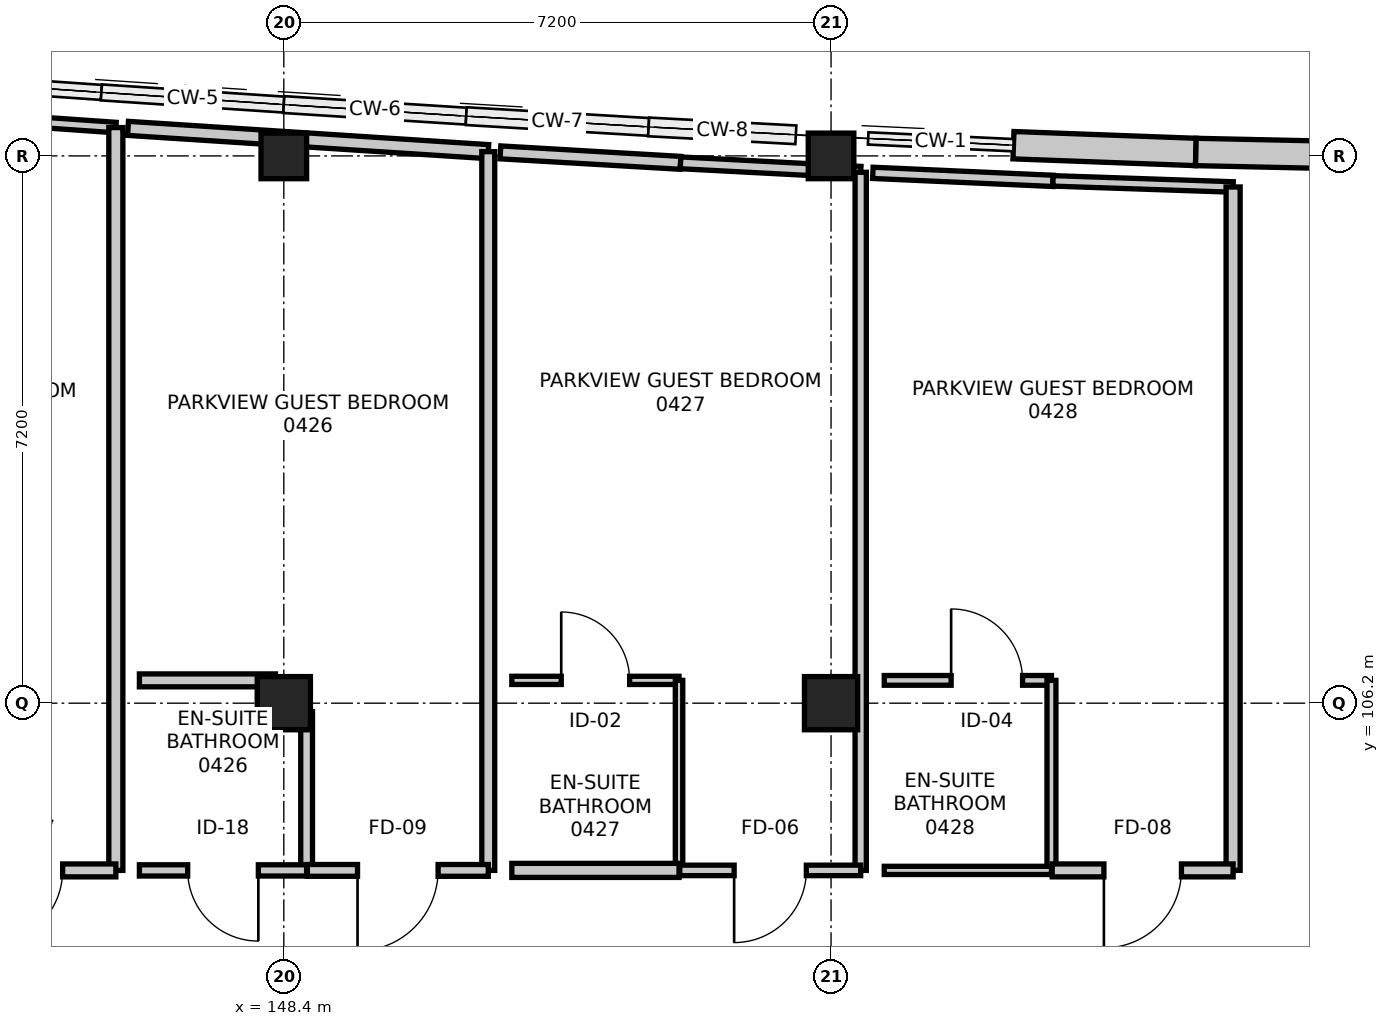
"""IFC4 building model, lengths in metres.
Left out: names, types, materials, properties, quantities, classifications, styles, units other than length and angle.
Written with IfcOpenShell. Run it as: python <this file> out.ifc"""

import sys

from ifc_helpers import new_model, si_unit, direction, frame, frame_2d, origin, origin_2d, place, context, subcontext, project, spatial, rectangle, extrude, element, fill, save


model = new_model("IFC4")
c1 = context("Model", 3, precision=1e-05, world=origin(), true_north=direction((0.0, 1.0)))
c2 = subcontext(c1, "Body", "Model", "MODEL_VIEW")
j1 = project(units=[si_unit("LENGTHUNIT", "METRE"), si_unit("PLANEANGLEUNIT", "RADIAN")], contexts=[c1])
p1 = place(None, origin())
s1 = spatial("IfcSite", under=j1, at=p1, CompositionType="ELEMENT")
p2 = place(p1, origin())
s2 = spatial("IfcBuilding", under=s1, at=p2, CompositionType="ELEMENT")
p3 = place(p2, frame((0.0, 0.0, 19.2)))
s3 = spatial("IfcBuildingStorey", under=s2, at=p3, CompositionType="ELEMENT", Elevation=19.2)
p4 = place(p3, frame((148.4, 106.2, 0.0), z_axis=(0.0, 0.0, 1.0), x_axis=(1.0, 0.0, 0.0)))
e1 = element("IfcColumn", 1, at=p4, inside=s3, PredefinedType="COLUMN", context=c2, shape_type="SweptSolid", body=[
    extrude(rectangle(XDim=0.7, YDim=0.7, at=origin_2d()), origin(), (0.0, 0.0, 1.0), 3.6),
])
p5 = place(p3, frame((148.4, 113.4, 0.0), z_axis=(0.0, 0.0, 1.0), x_axis=(1.0, 0.0, 0.0)))
e2 = element("IfcColumn", 2, at=p5, inside=s3, PredefinedType="COLUMN", context=c2, shape_type="SweptSolid", body=[
    extrude(rectangle(XDim=0.6, YDim=0.6, at=origin_2d()), origin(), (0.0, 0.0, 1.0), 3.6),
])
p6 = place(p3, frame((155.6, 106.2, 0.0), z_axis=(0.0, 0.0, 1.0), x_axis=(1.0, 0.0, 0.0)))
e3 = element("IfcColumn", 3, at=p6, inside=s3, PredefinedType="COLUMN", context=c2, shape_type="SweptSolid", body=[
    extrude(rectangle(XDim=0.7, YDim=0.7, at=origin_2d()), origin(), (0.0, 0.0, 1.0), 3.6),
])
p7 = place(p3, frame((155.6, 113.4, 0.0), z_axis=(0.0, 0.0, 1.0), x_axis=(1.0, 0.0, 0.0)))
e4 = element("IfcColumn", 4, at=p7, inside=s3, PredefinedType="COLUMN", context=c2, shape_type="SweptSolid", body=[
    extrude(rectangle(XDim=0.6, YDim=0.6, at=origin_2d()), origin(), (0.0, 0.0, 1.0), 3.6),
])
p8 = place(p3, frame((158.0, 113.541, 0.0), z_axis=(0.0, 0.0, 1.0), x_axis=(0.99930757318, -0.037207179225, 0.0)))
e5 = element("IfcWall", 5, at=p8, inside=s3, PredefinedType="STANDARD", context=c2, shape_type="SweptSolid", body=[
    extrude(rectangle(XDim=2.402, YDim=0.36, at=frame_2d((1.201, 0.0))), origin(), (0.0, 0.0, 1.0), 2.735),
])
p9 = place(p3, frame((160.4, 113.452, 0.0), z_axis=(0.0, 0.0, 1.0), x_axis=(0.999767568547, -0.021559426766, 0.0)))
e6 = element("IfcWall", 6, at=p9, inside=s3, PredefinedType="STANDARD", context=c2, shape_type="SweptSolid", body=[
    extrude(rectangle(XDim=2.401, YDim=0.36, at=frame_2d((1.2, 0.0))), origin(), (0.0, 0.0, 1.0), 2.735),
])
p10 = place(p3, frame((141.45, 114.104, 0.0), z_axis=(0.0, 0.0, 1.0), x_axis=(0.997573441298, -0.069622045478, 0.0)))
e7 = element("IfcWall", 7, at=p10, inside=s3, PredefinedType="PARTITIONING", context=c2, shape_type="SweptSolid", body=[
    extrude(rectangle(XDim=4.751, YDim=0.138, at=frame_2d((2.376, 0.0))), origin(), (0.0, 0.0, 1.0), 2.926),
])
p11 = place(p3, frame((146.19, 113.773, 0.0), z_axis=(0.0, 0.0, 1.0), x_axis=(0.0, -1.0, 0.0)))
e8 = element("IfcWall", 8, at=p11, inside=s3, PredefinedType="PARTITIONING", context=c2, shape_type="SweptSolid", body=[
    extrude(rectangle(XDim=9.773, YDim=0.185, at=frame_2d((4.886, 0.0))), origin(), (0.0, 0.0, 1.0), 2.735),
])
p12 = place(p3, frame((146.19, 104.0, 0.0), z_axis=(0.0, 0.0, 1.0), x_axis=(-1.0, 0.0, 0.0)))
e9 = element("IfcWall", 9, at=p12, inside=s3, PredefinedType="PARTITIONING", context=c2, shape_type="SweptSolid", body=[
    extrude(rectangle(XDim=2.38, YDim=0.17, at=frame_2d((1.19, 0.0))), origin(), (0.0, 0.0, 1.0), 3.35),
])
p13 = place(p12, frame((0.7, 0.0, 0.0)))
e10 = element("IfcOpeningElement", 10, at=p13, cuts=e9, PredefinedType="OPENING", context=c2, shape_type="SweptSolid", body=[
    extrude(rectangle(XDim=0.98, YDim=2.15, at=frame_2d((0.49, 1.075))), frame((0.0, 0.095, 0.0), z_axis=(0.0, -1.0, 0.0), x_axis=(1.0, 0.0, 0.0)), (0.0, 0.0, 1.0), 0.19),
])
p14 = place(p3, frame((146.5, 106.5, 0.0), z_axis=(0.0, 0.0, 1.0), x_axis=(1.0, 0.0, 0.0)))
e11 = element("IfcWall", 11, at=p14, inside=s3, PredefinedType="PARTITIONING", context=c2, shape_type="SweptSolid", body=[
    extrude(rectangle(XDim=1.79, YDim=0.17, at=frame_2d((0.895, 0.0))), origin(), (0.0, 0.0, 1.0), 2.685),
])
p15 = place(p3, frame((148.7, 106.09, 0.0), z_axis=(0.0, 0.0, 1.0), x_axis=(0.0, -1.0, 0.0)))
e12 = element("IfcWall", 12, at=p15, inside=s3, PredefinedType="PARTITIONING", context=c2, shape_type="SweptSolid", body=[
    extrude(rectangle(XDim=2.09, YDim=0.155, at=frame_2d((1.045, 0.0))), origin(), (0.0, 0.0, 1.0), 2.685),
])
p16 = place(p3, frame((148.7, 104.0, 0.0), z_axis=(0.0, 0.0, 1.0), x_axis=(-1.0, 0.0, 0.0)))
e13 = element("IfcWall", 13, at=p16, inside=s3, PredefinedType="PARTITIONING", context=c2, shape_type="SweptSolid", body=[
    extrude(rectangle(XDim=2.2, YDim=0.148, at=frame_2d((1.1, 0.0))), origin(), (0.0, 0.0, 1.0), 2.685),
])
p17 = place(p16, frame((0.635, 0.0, 0.0)))
e14 = element("IfcOpeningElement", 14, at=p17, cuts=e13, PredefinedType="OPENING", context=c2, shape_type="SweptSolid", body=[
    extrude(rectangle(XDim=0.93, YDim=2.13, at=frame_2d((0.465, 1.065))), frame((0.0, 0.084, 0.0), z_axis=(0.0, -1.0, 0.0), x_axis=(1.0, 0.0, 0.0)), (0.0, 0.0, 1.0), 0.168),
])
p18 = place(p3, frame((146.35, 113.762, 0.0), z_axis=(0.0, 0.0, 1.0), x_axis=(0.997920619119, -0.064454929507, 0.0)))
e15 = element("IfcWall", 15, at=p18, inside=s3, PredefinedType="PARTITIONING", context=c2, shape_type="SweptSolid", body=[
    extrude(rectangle(XDim=4.75, YDim=0.185, at=frame_2d((2.375, 0.0))), origin(), (0.0, 0.0, 1.0), 2.735),
])
p19 = place(p3, frame((151.09, 113.456, 0.0), z_axis=(0.0, 0.0, 1.0), x_axis=(0.0, -1.0, 0.0)))
e16 = element("IfcWall", 16, at=p19, inside=s3, PredefinedType="PARTITIONING", context=c2, shape_type="SweptSolid", body=[
    extrude(rectangle(XDim=9.456, YDim=0.17, at=frame_2d((4.728, 0.0))), origin(), (0.0, 0.0, 1.0), 2.735),
])
p20 = place(p3, frame((151.09, 104.0, 0.0), z_axis=(0.0, 0.0, 1.0), x_axis=(-1.0, 0.0, 0.0)))
e17 = element("IfcWall", 17, at=p20, inside=s3, PredefinedType="PARTITIONING", context=c2, shape_type="SweptSolid", body=[
    extrude(rectangle(XDim=2.38, YDim=0.155, at=frame_2d((1.19, 0.0))), origin(), (0.0, 0.0, 1.0), 3.35),
])
p21 = place(p20, frame((0.66, 0.0, 0.0)))
e18 = element("IfcOpeningElement", 18, at=p21, cuts=e17, PredefinedType="OPENING", context=c2, shape_type="SweptSolid", body=[
    extrude(rectangle(XDim=1.06, YDim=2.2, at=frame_2d((0.53, 1.1))), frame((0.0, 0.087, 0.0), z_axis=(0.0, -1.0, 0.0), x_axis=(1.0, 0.0, 0.0)), (0.0, 0.0, 1.0), 0.175),
])
p22 = place(p3, frame((151.4, 106.5, 0.0), z_axis=(0.0, 0.0, 1.0), x_axis=(1.0, 0.0, 0.0)))
e19 = element("IfcWall", 19, at=p22, inside=s3, PredefinedType="PARTITIONING", context=c2, shape_type="SweptSolid", body=[
    extrude(rectangle(XDim=2.2, YDim=0.108, at=frame_2d((1.1, 0.0))), origin(), (0.0, 0.0, 1.0), 3.35),
])
p23 = place(p22, frame((0.65, 0.0, 0.0)))
e20 = element("IfcOpeningElement", 20, at=p23, cuts=e19, PredefinedType="OPENING", context=c2, shape_type="SweptSolid", body=[
    extrude(rectangle(XDim=0.9, YDim=2.08, at=frame_2d((0.45, 1.04))), frame((0.0, 0.064, 0.0), z_axis=(0.0, -1.0, 0.0), x_axis=(1.0, 0.0, 0.0)), (0.0, 0.0, 1.0), 0.128),
])
p24 = place(p3, frame((153.6, 106.5, 0.0), z_axis=(0.0, 0.0, 1.0), x_axis=(0.0, -1.0, 0.0)))
e21 = element("IfcWall", 21, at=p24, inside=s3, PredefinedType="PARTITIONING", context=c2, shape_type="SweptSolid", body=[
    extrude(rectangle(XDim=2.5, YDim=0.098, at=frame_2d((1.25, 0.0))), origin(), (0.0, 0.0, 1.0), 2.735),
])
p25 = place(p3, frame((153.6, 104.0, 0.0), z_axis=(0.0, 0.0, 1.0), x_axis=(-1.0, 0.0, 0.0)))
e22 = element("IfcWall", 22, at=p25, inside=s3, PredefinedType="PARTITIONING", context=c2, shape_type="SweptSolid", body=[
    extrude(rectangle(XDim=2.2, YDim=0.185, at=frame_2d((1.1, 0.0))), origin(), (0.0, 0.0, 1.0), 3.35),
])
p26 = place(p3, frame((151.25, 113.447, 0.0), z_axis=(0.0, 0.0, 1.0), x_axis=(0.998316663257, -0.057998619497, 0.0)))
e23 = element("IfcWall", 23, at=p26, inside=s3, PredefinedType="PARTITIONING", context=c2, shape_type="SweptSolid", body=[
    extrude(rectangle(XDim=2.374, YDim=0.17, at=frame_2d((1.187, 0.0))), origin(), (0.0, 0.0, 1.0), 2.735),
])
p27 = place(p3, frame((153.62, 113.309, 0.0), z_axis=(0.0, 0.0, 1.0), x_axis=(0.998628041285, -0.052364445556, 0.0)))
e24 = element("IfcWall", 24, at=p27, inside=s3, PredefinedType="PARTITIONING", context=c2, shape_type="SweptSolid", body=[
    extrude(rectangle(XDim=2.373, YDim=0.155, at=frame_2d((1.187, 0.0))), origin(), (0.0, 0.0, 1.0), 2.685),
])
p28 = place(p3, frame((155.99, 113.185, 0.0), z_axis=(0.0, 0.0, 1.0), x_axis=(0.0, -1.0, 0.0)))
e25 = element("IfcWall", 25, at=p28, inside=s3, PredefinedType="PARTITIONING", context=c2, shape_type="SweptSolid", body=[
    extrude(rectangle(XDim=9.185, YDim=0.148, at=frame_2d((4.592, 0.0))), origin(), (0.0, 0.0, 1.0), 2.735),
])
p29 = place(p3, frame((155.99, 104.0, 0.0), z_axis=(0.0, 0.0, 1.0), x_axis=(-1.0, 0.0, 0.0)))
e26 = element("IfcWall", 26, at=p29, inside=s3, PredefinedType="PARTITIONING", context=c2, shape_type="SweptSolid", body=[
    extrude(rectangle(XDim=2.38, YDim=0.138, at=frame_2d((1.19, 0.0))), origin(), (0.0, 0.0, 1.0), 2.685),
])
p30 = place(p29, frame((0.715, 0.0, 0.0)))
e27 = element("IfcOpeningElement", 27, at=p30, cuts=e26, PredefinedType="OPENING", context=c2, shape_type="SweptSolid", body=[
    extrude(rectangle(XDim=0.95, YDim=2.1, at=frame_2d((0.475, 1.05))), frame((0.0, 0.079, 0.0), z_axis=(0.0, -1.0, 0.0), x_axis=(1.0, 0.0, 0.0)), (0.0, 0.0, 1.0), 0.158),
])
p31 = place(p3, frame((156.3, 106.5, 0.0), z_axis=(0.0, 0.0, 1.0), x_axis=(1.0, 0.0, 0.0)))
e28 = element("IfcWall", 28, at=p31, inside=s3, PredefinedType="PARTITIONING", context=c2, shape_type="SweptSolid", body=[
    extrude(rectangle(XDim=2.2, YDim=0.128, at=frame_2d((1.1, 0.0))), origin(), (0.0, 0.0, 1.0), 3.35),
])
p32 = place(p31, frame((0.88, 0.0, 0.0)))
e29 = element("IfcOpeningElement", 29, at=p32, cuts=e28, PredefinedType="OPENING", context=c2, shape_type="SweptSolid", body=[
    extrude(rectangle(XDim=0.94, YDim=2.12, at=frame_2d((0.47, 1.06))), frame((0.0, 0.074, 0.0), z_axis=(0.0, -1.0, 0.0), x_axis=(1.0, 0.0, 0.0)), (0.0, 0.0, 1.0), 0.148),
])
p33 = place(p3, frame((158.5, 106.5, 0.0), z_axis=(0.0, 0.0, 1.0), x_axis=(0.0, -1.0, 0.0)))
e30 = element("IfcWall", 30, at=p33, inside=s3, PredefinedType="PARTITIONING", context=c2, shape_type="SweptSolid", body=[
    extrude(rectangle(XDim=2.5, YDim=0.118, at=frame_2d((1.25, 0.0))), origin(), (0.0, 0.0, 1.0), 2.735),
])
p34 = place(p3, frame((158.5, 104.0, 0.0), z_axis=(0.0, 0.0, 1.0), x_axis=(-1.0, 0.0, 0.0)))
e31 = element("IfcWall", 31, at=p34, inside=s3, PredefinedType="PARTITIONING", context=c2, shape_type="SweptSolid", body=[
    extrude(rectangle(XDim=2.2, YDim=0.108, at=frame_2d((1.1, 0.0))), origin(), (0.0, 0.0, 1.0), 3.35),
])
p35 = place(p3, frame((156.15, 113.177, 0.0), z_axis=(0.0, 0.0, 1.0), x_axis=(0.999006795059, -0.044558090468, 0.0)))
e32 = element("IfcWall", 32, at=p35, inside=s3, PredefinedType="PARTITIONING", context=c2, shape_type="SweptSolid", body=[
    extrude(rectangle(XDim=2.373, YDim=0.148, at=frame_2d((1.186, 0.0))), origin(), (0.0, 0.0, 1.0), 2.735),
])
p36 = place(p3, frame((158.52, 113.072, 0.0), z_axis=(0.0, 0.0, 1.0), x_axis=(0.999426124388, -0.033873616454, 0.0)))
e33 = element("IfcWall", 33, at=p36, inside=s3, PredefinedType="PARTITIONING", context=c2, shape_type="SweptSolid", body=[
    extrude(rectangle(XDim=2.371, YDim=0.138, at=frame_2d((1.186, 0.0))), origin(), (0.0, 0.0, 1.0), 3.35),
])
p37 = place(p3, frame((160.89, 112.991, 0.0), z_axis=(0.0, 0.0, 1.0), x_axis=(0.0, -1.0, 0.0)))
e34 = element("IfcWall", 34, at=p37, inside=s3, PredefinedType="PARTITIONING", context=c2, shape_type="SweptSolid", body=[
    extrude(rectangle(XDim=8.991, YDim=0.185, at=frame_2d((4.496, 0.0))), origin(), (0.0, 0.0, 1.0), 2.735),
])
p38 = place(p3, frame((160.89, 104.0, 0.0), z_axis=(0.0, 0.0, 1.0), x_axis=(-1.0, 0.0, 0.0)))
e35 = element("IfcWall", 35, at=p38, inside=s3, PredefinedType="PARTITIONING", context=c2, shape_type="SweptSolid", body=[
    extrude(rectangle(XDim=2.38, YDim=0.17, at=frame_2d((1.19, 0.0))), origin(), (0.0, 0.0, 1.0), 3.35),
])
p39 = place(p38, frame((0.68, 0.0, 0.0)))
e36 = element("IfcOpeningElement", 36, at=p39, cuts=e35, PredefinedType="OPENING", context=c2, shape_type="SweptSolid", body=[
    extrude(rectangle(XDim=1.02, YDim=2.15, at=frame_2d((0.51, 1.075))), frame((0.0, 0.095, 0.0), z_axis=(0.0, -1.0, 0.0), x_axis=(1.0, 0.0, 0.0)), (0.0, 0.0, 1.0), 0.19),
])
p40 = place(p13, origin())
e37 = element("IfcDoor", 37, at=p40, inside=s3, OperationType="SINGLE_SWING_RIGHT", PredefinedType="DOOR", context=c2, shape_type="SweptSolid", body=[
    extrude(rectangle(XDim=0.98, YDim=2.15, at=frame_2d((0.49, 1.075))), frame((0.0, 0.025, 0.0), z_axis=(0.0, -1.0, 0.0), x_axis=(1.0, 0.0, 0.0)), (0.0, 0.0, 1.0), 0.05),
])
fill(e10, e37)
p41 = place(p17, origin())
e38 = element("IfcDoor", 38, at=p41, inside=s3, OperationType="SINGLE_SWING_LEFT", PredefinedType="DOOR", context=c2, shape_type="SweptSolid", body=[
    extrude(rectangle(XDim=0.93, YDim=2.13, at=frame_2d((0.465, 1.065))), frame((0.0, 0.025, 0.0), z_axis=(0.0, -1.0, 0.0), x_axis=(1.0, 0.0, 0.0)), (0.0, 0.0, 1.0), 0.05),
])
fill(e14, e38)
p42 = place(p21, origin())
e39 = element("IfcDoor", 39, at=p42, inside=s3, OperationType="SINGLE_SWING_RIGHT", PredefinedType="DOOR", context=c2, shape_type="SweptSolid", body=[
    extrude(rectangle(XDim=1.06, YDim=2.2, at=frame_2d((0.53, 1.1))), frame((0.0, 0.025, 0.0), z_axis=(0.0, -1.0, 0.0), x_axis=(1.0, 0.0, 0.0)), (0.0, 0.0, 1.0), 0.05),
])
fill(e18, e39)
p43 = place(p23, origin())
e40 = element("IfcDoor", 40, at=p43, inside=s3, OperationType="SINGLE_SWING_LEFT", PredefinedType="DOOR", context=c2, shape_type="SweptSolid", body=[
    extrude(rectangle(XDim=0.9, YDim=2.08, at=frame_2d((0.45, 1.04))), frame((0.0, 0.025, 0.0), z_axis=(0.0, -1.0, 0.0), x_axis=(1.0, 0.0, 0.0)), (0.0, 0.0, 1.0), 0.05),
])
fill(e20, e40)
p44 = place(p30, origin())
e41 = element("IfcDoor", 41, at=p44, inside=s3, OperationType="SINGLE_SWING_RIGHT", PredefinedType="DOOR", context=c2, shape_type="SweptSolid", body=[
    extrude(rectangle(XDim=0.95, YDim=2.1, at=frame_2d((0.475, 1.05))), frame((0.0, 0.025, 0.0), z_axis=(0.0, -1.0, 0.0), x_axis=(1.0, 0.0, 0.0)), (0.0, 0.0, 1.0), 0.05),
])
fill(e27, e41)
p45 = place(p32, origin())
e42 = element("IfcDoor", 42, at=p45, inside=s3, OperationType="SINGLE_SWING_LEFT", PredefinedType="DOOR", context=c2, shape_type="SweptSolid", body=[
    extrude(rectangle(XDim=0.94, YDim=2.12, at=frame_2d((0.47, 1.06))), frame((0.0, 0.025, 0.0), z_axis=(0.0, -1.0, 0.0), x_axis=(1.0, 0.0, 0.0)), (0.0, 0.0, 1.0), 0.05),
])
fill(e29, e42)
p46 = place(p39, origin())
e43 = element("IfcDoor", 43, at=p46, inside=s3, OperationType="SINGLE_SWING_RIGHT", PredefinedType="DOOR", context=c2, shape_type="SweptSolid", body=[
    extrude(rectangle(XDim=1.02, YDim=2.15, at=frame_2d((0.51, 1.075))), frame((0.0, 0.025, 0.0), z_axis=(0.0, -1.0, 0.0), x_axis=(1.0, 0.0, 0.0)), (0.0, 0.0, 1.0), 0.05),
])
fill(e36, e43)
save(model, sys.argv[1])
